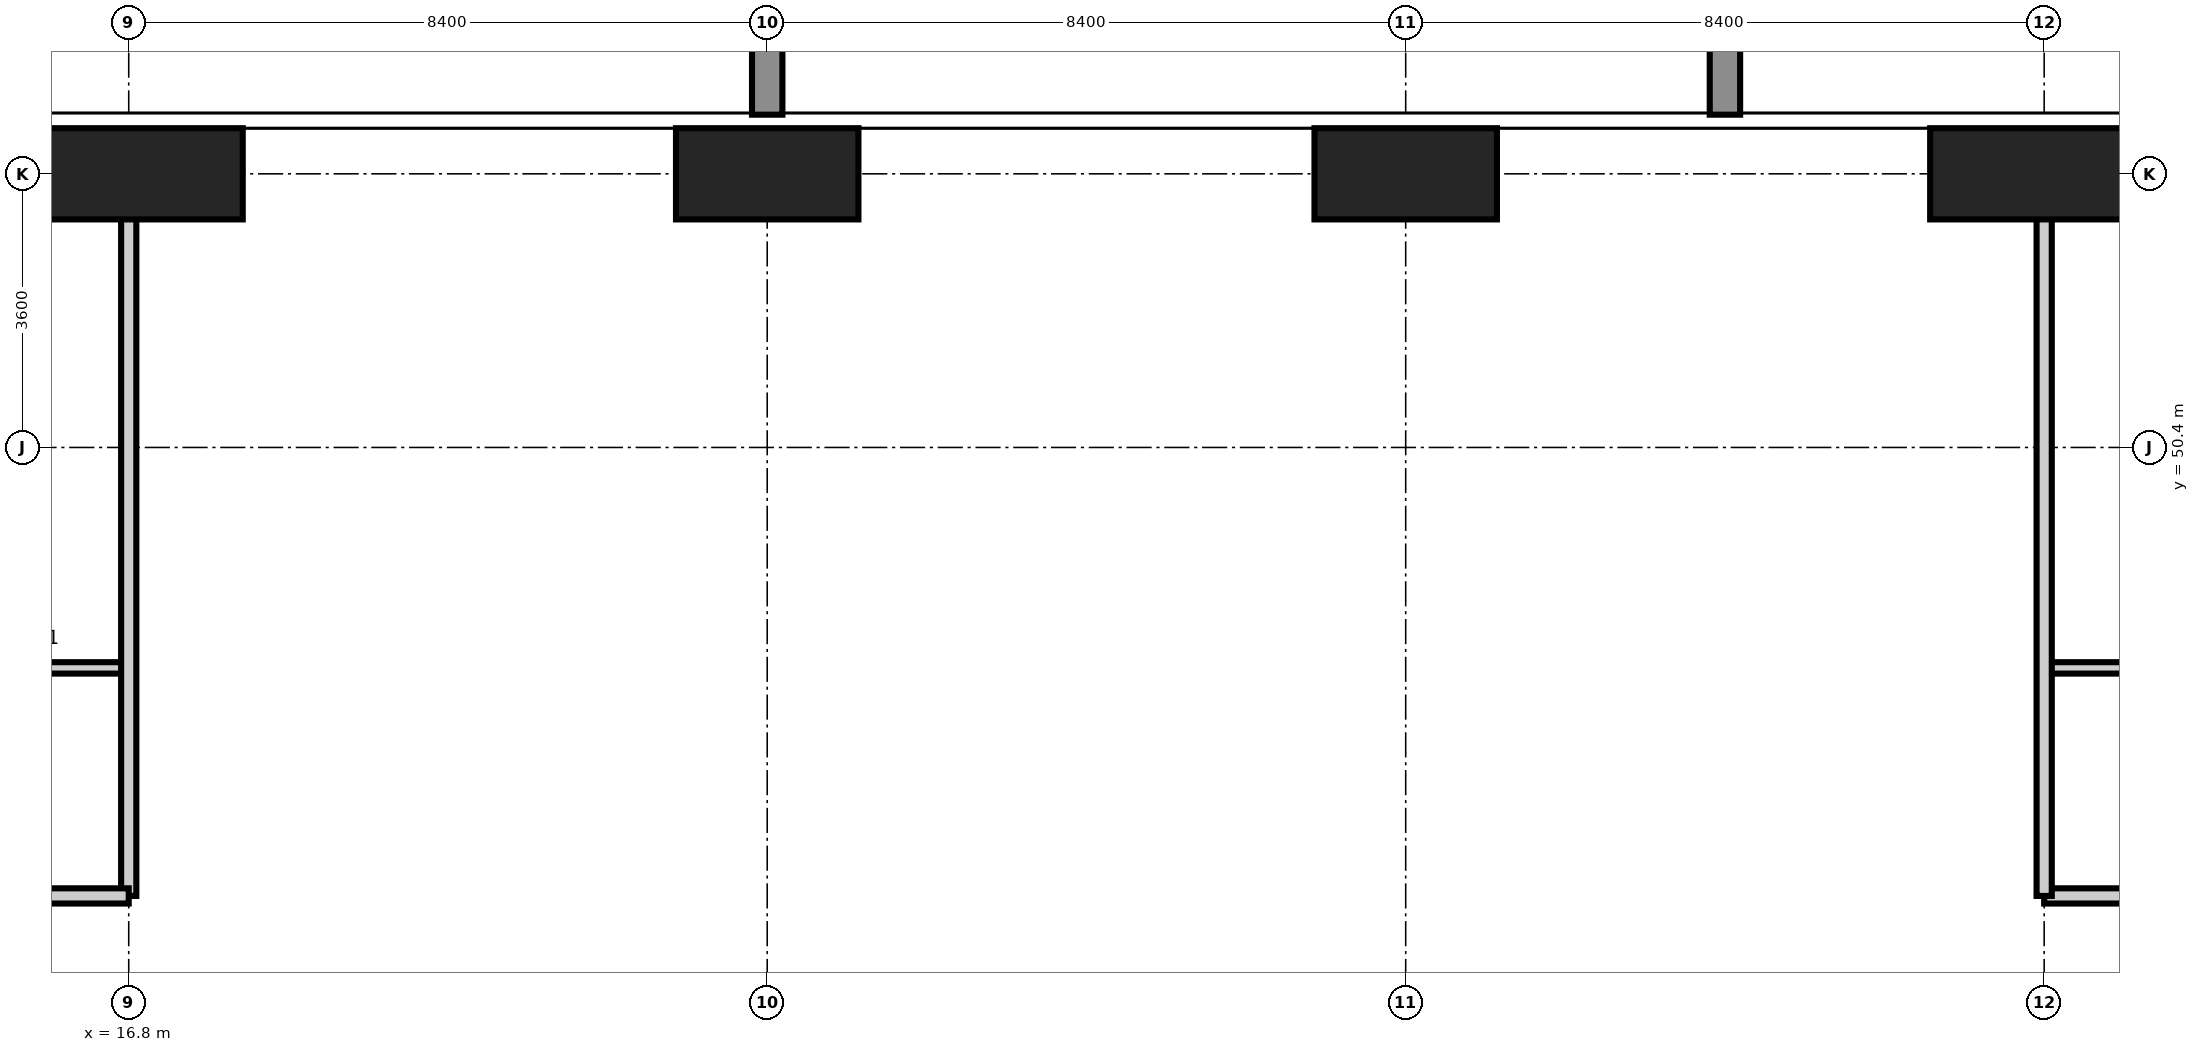
"""IFC4 building model, lengths in metres.
Left out: names, types, materials, properties, quantities, classifications, styles, units other than length and angle.
Written with IfcOpenShell. Run it as: python <this file> out.ifc"""

import sys

from ifc_helpers import new_model, si_unit, direction, frame, frame_2d, origin, origin_2d, place, context, subcontext, project, spatial, rectangle, extrude, element, save


model = new_model("IFC4")
c1 = context("Model", 3, precision=1e-05, world=origin(), true_north=direction((0.0, 1.0)))
c2 = subcontext(c1, "Body", "Model", "MODEL_VIEW")
j1 = project(units=[si_unit("LENGTHUNIT", "METRE"), si_unit("PLANEANGLEUNIT", "RADIAN")], contexts=[c1])
p1 = place(None, origin())
s1 = spatial("IfcSite", under=j1, at=p1, CompositionType="ELEMENT")
p2 = place(p1, origin())
s2 = spatial("IfcBuilding", under=s1, at=p2, CompositionType="ELEMENT")
p3 = place(p2, frame((0.0, 0.0, 162.6)))
s3 = spatial("IfcBuildingStorey", under=s2, at=p3, CompositionType="ELEMENT", Elevation=162.6)
p4 = place(p3, frame((16.8, 54.0, -0.35), z_axis=(0.0, 0.0, 1.0), x_axis=(1.0, 0.0, 0.0)))
e1 = element("IfcColumn", 1, at=p4, inside=s3, PredefinedType="COLUMN", context=c2, shape_type="SweptSolid", body=[
    extrude(rectangle(XDim=3.0, YDim=1.2, at=origin_2d()), origin(), (0.0, 0.0, 1.0), 3.6),
])
for number, where, z_axis, x_axis in (
    (2, (25.2, 54.0, -0.35), (0.0, 0.0, 1.0), (1.0, 0.0, 0.0)),
    (3, (33.6, 54.0, -0.35), (0.0, 0.0, 1.0), (1.0, 0.0, 0.0)),
):
    element("IfcColumn", number, at=place(p3, frame(where, z_axis=z_axis, x_axis=x_axis)), inside=s3, PredefinedType="COLUMN", context=c2, shape_type="SweptSolid", body=[
        extrude(rectangle(XDim=2.4, YDim=1.2, at=origin_2d()), origin(), (0.0, 0.0, 1.0), 3.6),
    ])
p5 = place(p3, frame((42.0, 54.0, -0.35), z_axis=(0.0, 0.0, 1.0), x_axis=(1.0, 0.0, 0.0)))
e4 = element("IfcColumn", 4, at=p5, inside=s3, PredefinedType="COLUMN", context=c2, shape_type="SweptSolid", body=[
    extrude(rectangle(XDim=3.0, YDim=1.2, at=origin_2d()), origin(), (0.0, 0.0, 1.0), 3.6),
])
p6 = place(p3, frame((13.7, 47.5, 0.0), z_axis=(0.0, 0.0, 1.0), x_axis=(1.0, 0.0, 0.0)))
e5 = element("IfcWall", 5, at=p6, inside=s3, PredefinedType="PARTITIONING", context=c2, shape_type="SweptSolid", body=[
    extrude(rectangle(XDim=3.1, YDim=0.15, at=frame_2d((1.55, 0.0))), origin(), (0.0, 0.0, 1.0), 3.25),
])
p7 = place(p6, frame((1.125, 0.0, 0.0)))
e6 = element("IfcOpeningElement", 6, at=p7, cuts=e5, PredefinedType="OPENING", context=c2, shape_type="SweptSolid", body=[
    extrude(rectangle(XDim=0.85, YDim=2.1, at=frame_2d((0.425, 1.05))), frame((0.0, 0.085, 0.0), z_axis=(0.0, -1.0, 0.0), x_axis=(1.0, 0.0, 0.0)), (0.0, 0.0, 1.0), 0.17),
])
p8 = place(p3, frame((42.0, 47.5, 0.0), z_axis=(0.0, 0.0, 1.0), x_axis=(1.0, 0.0, 0.0)))
e7 = element("IfcWall", 7, at=p8, inside=s3, PredefinedType="PARTITIONING", context=c2, shape_type="SweptSolid", body=[
    extrude(rectangle(XDim=3.7, YDim=0.15, at=frame_2d((1.85, 0.0))), origin(), (0.0, 0.0, 1.0), 3.25),
])
p9 = place(p8, frame((1.425, 0.0, 0.0)))
e8 = element("IfcOpeningElement", 8, at=p9, cuts=e7, PredefinedType="OPENING", context=c2, shape_type="SweptSolid", body=[
    extrude(rectangle(XDim=0.85, YDim=2.1, at=frame_2d((0.425, 1.05))), frame((0.0, 0.085, 0.0), z_axis=(0.0, -1.0, 0.0), x_axis=(1.0, 0.0, 0.0)), (0.0, 0.0, 1.0), 0.17),
])
p10 = place(p3, frame((16.8, 44.5, 0.0), z_axis=(0.0, 0.0, 1.0), x_axis=(0.0, 1.0, 0.0)))
e9 = element("IfcWall", 9, at=p10, inside=s3, PredefinedType="PARTITIONING", context=c2, shape_type="SweptSolid", body=[
    extrude(rectangle(XDim=10.118, YDim=0.2, at=frame_2d((5.059, 0.0))), origin(), (0.0, 0.0, 1.0), 3.25),
])
p11 = place(p3, frame((13.7, 44.5, 0.0), z_axis=(0.0, 0.0, 1.0), x_axis=(1.0, 0.0, 0.0)))
e10 = element("IfcWall", 10, at=p11, inside=s3, PredefinedType="PARTITIONING", context=c2, shape_type="SweptSolid", body=[
    extrude(rectangle(XDim=3.1, YDim=0.2, at=frame_2d((1.55, 0.0))), origin(), (0.0, 0.0, 1.0), 3.25),
])
p12 = place(p3, frame((42.0, 44.5, 0.0), z_axis=(0.0, 0.0, 1.0), x_axis=(1.0, 0.0, 0.0)))
e11 = element("IfcWall", 11, at=p12, inside=s3, PredefinedType="PARTITIONING", context=c2, shape_type="SweptSolid", body=[
    extrude(rectangle(XDim=3.7, YDim=0.2, at=frame_2d((1.85, 0.0))), origin(), (0.0, 0.0, 1.0), 3.25),
])
p13 = place(p3, frame((42.0, 54.618, 0.0), z_axis=(0.0, 0.0, 1.0), x_axis=(0.0, -1.0, 0.0)))
e12 = element("IfcWall", 12, at=p13, inside=s3, PredefinedType="PARTITIONING", context=c2, shape_type="SweptSolid", body=[
    extrude(rectangle(XDim=10.118, YDim=0.2, at=frame_2d((5.059, 0.0))), origin(), (0.0, 0.0, 1.0), 3.25),
])
save(model, sys.argv[1])
